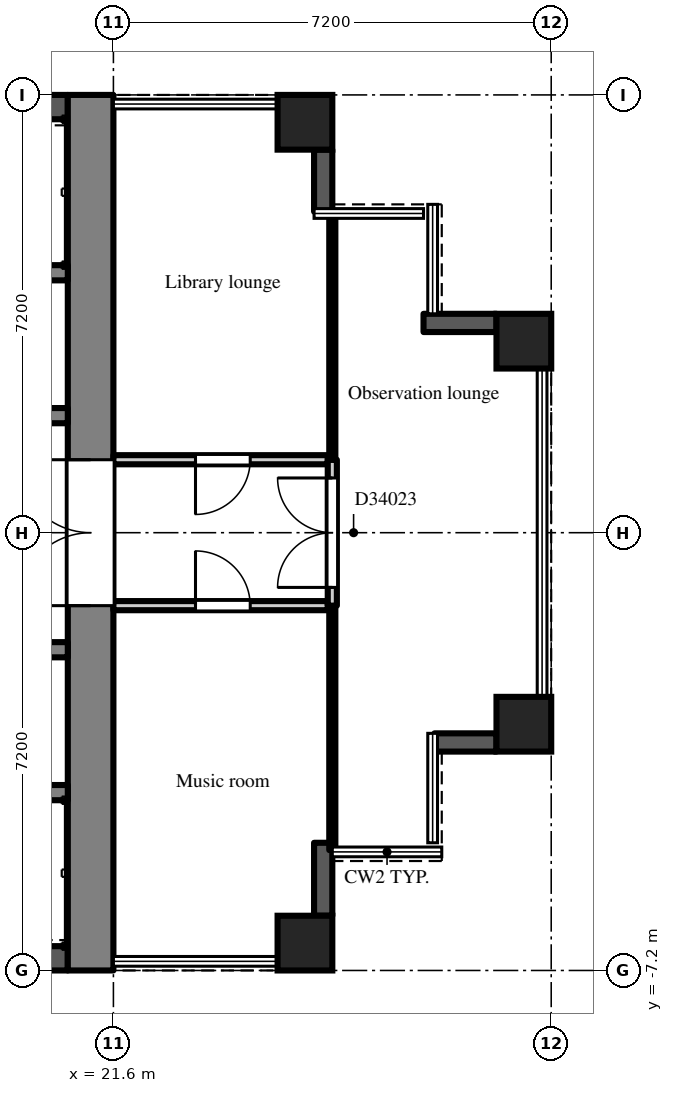
"""IFC4 building model, lengths in metres.
Left out: names, types, materials, properties, quantities, classifications, styles, units other than length and angle.
Written with IfcOpenShell. Run it as: python <this file> out.ifc"""

import sys

from ifc_helpers import new_model, si_unit, direction, frame, frame_2d, origin, origin_2d, place, context, subcontext, project, spatial, rectangle, extrude, element, fill, save


model = new_model("IFC4")
c1 = context("Model", 3, precision=1e-05, world=origin(), true_north=direction((0.0, 1.0)))
c2 = subcontext(c1, "Body", "Model", "MODEL_VIEW")
j1 = project(units=[si_unit("LENGTHUNIT", "METRE"), si_unit("PLANEANGLEUNIT", "RADIAN")], contexts=[c1])
p1 = place(None, origin())
s1 = spatial("IfcSite", under=j1, at=p1, CompositionType="ELEMENT")
p2 = place(p1, origin())
s2 = spatial("IfcBuilding", under=s1, at=p2, CompositionType="ELEMENT")
p3 = place(p2, frame((0.0, 0.0, 237.9)))
s3 = spatial("IfcBuildingStorey", under=s2, at=p3, CompositionType="ELEMENT", Elevation=237.9)
for number, where, z_axis, x_axis in (
    (1, (24.75, -6.75, 0.0), (0.0, 0.0, 1.0), (1.0, 0.0, 0.0)),
    (2, (24.75, 6.75, 0.0), (0.0, 0.0, 1.0), (1.0, 0.0, 0.0)),
    (3, (28.35, -3.15, 0.0), (0.0, 0.0, 1.0), (1.0, 0.0, 0.0)),
    (4, (28.35, 3.15, 0.0), (0.0, 0.0, 1.0), (1.0, 0.0, 0.0)),
):
    element("IfcColumn", number, at=place(p3, frame(where, z_axis=z_axis, x_axis=x_axis)), inside=s3, PredefinedType="COLUMN", context=c2, shape_type="SweptSolid", body=[
        extrude(rectangle(XDim=0.9, YDim=0.9, at=origin_2d()), origin(), (0.0, 0.0, 1.0), 4.2),
    ])
p4 = place(p3, frame((25.05, -6.3, 0.0), z_axis=(0.0, 0.0, 1.0), x_axis=(0.0, 1.0, 0.0)))
e5 = element("IfcWall", 5, at=p4, inside=s3, PredefinedType="SOLIDWALL", context=c2, shape_type="SweptSolid", body=[
    extrude(rectangle(XDim=1.2, YDim=0.3, at=frame_2d((0.6, 0.0))), origin(), (0.0, 0.0, 1.0), 3.75),
])
p5 = place(p3, frame((26.88, -3.45, 0.0), z_axis=(0.0, 0.0, 1.0), x_axis=(1.0, 0.0, 0.0)))
e6 = element("IfcWall", 6, at=p5, inside=s3, PredefinedType="SOLIDWALL", context=c2, shape_type="SweptSolid", body=[
    extrude(rectangle(XDim=1.02, YDim=0.3, at=frame_2d((0.51, 0.0))), origin(), (0.0, 0.0, 1.0), 3.75),
])
p6 = place(p3, frame((27.9, 3.45, 0.0), z_axis=(0.0, 0.0, 1.0), x_axis=(-1.0, 0.0, 0.0)))
e7 = element("IfcWall", 7, at=p6, inside=s3, PredefinedType="SOLIDWALL", context=c2, shape_type="SweptSolid", body=[
    extrude(rectangle(XDim=1.2, YDim=0.3, at=frame_2d((0.6, 0.0))), origin(), (0.0, 0.0, 1.0), 3.75),
])
p7 = place(p3, frame((25.05, 5.28, 0.0), z_axis=(0.0, 0.0, 1.0), x_axis=(0.0, 1.0, 0.0)))
e8 = element("IfcWall", 8, at=p7, inside=s3, PredefinedType="SOLIDWALL", context=c2, shape_type="SweptSolid", body=[
    extrude(rectangle(XDim=1.02, YDim=0.3, at=frame_2d((0.51, 0.0))), origin(), (0.0, 0.0, 1.0), 3.75),
])
p8 = place(p3, frame((21.225, -7.2, 0.0), z_axis=(0.0, 0.0, 1.0), x_axis=(0.0, 1.0, 0.0)))
e9 = element("IfcWall", 9, at=p8, inside=s3, PredefinedType="SHEAR", context=c2, shape_type="SweptSolid", body=[
    extrude(rectangle(XDim=14.4, YDim=0.75, at=frame_2d((7.2, 0.0))), origin(), (0.0, 0.0, 1.0), 3.75),
])
p9 = place(p8, frame((6.0, 0.0, 0.0)))
e10 = element("IfcOpeningElement", 10, at=p9, cuts=e9, PredefinedType="OPENING", context=c2, shape_type="SweptSolid", body=[
    extrude(rectangle(XDim=2.4, YDim=2.2, at=frame_2d((1.2, 1.1))), frame((0.0, 0.385, 0.0), z_axis=(0.0, -1.0, 0.0), x_axis=(1.0, 0.0, 0.0)), (0.0, 0.0, 1.0), 0.77),
])
p10 = place(p3, frame((7.9, 7.0, 0.0), z_axis=(0.0, 0.0, 1.0), x_axis=(1.0, 0.0, 0.0)))
e11 = element("IfcWall", 11, at=p10, inside=s3, PredefinedType="SHEAR", context=c2, shape_type="SweptSolid", body=[
    extrude(rectangle(XDim=12.95, YDim=0.4, at=frame_2d((6.475, 0.0))), origin(), (0.0, 0.0, 1.0), 3.75),
])
p11 = place(p3, frame((7.9, 1.925, 0.0), z_axis=(0.0, 0.0, 1.0), x_axis=(1.0, 0.0, 0.0)))
e12 = element("IfcWall", 12, at=p11, inside=s3, PredefinedType="SHEAR", context=c2, shape_type="SweptSolid", body=[
    extrude(rectangle(XDim=12.95, YDim=0.25, at=frame_2d((6.475, 0.0))), origin(), (0.0, 0.0, 1.0), 3.75),
])
p12 = place(p11, frame((4.825, 0.0, 0.0)))
e13 = element("IfcOpeningElement", 13, at=p12, cuts=e12, PredefinedType="OPENING", context=c2, shape_type="SweptSolid", body=[
    extrude(rectangle(XDim=1.1, YDim=2.1, at=frame_2d((0.55, 1.05))), frame((0.0, 0.135, 0.0), z_axis=(0.0, -1.0, 0.0), x_axis=(1.0, 0.0, 0.0)), (0.0, 0.0, 1.0), 0.27),
])
p13 = place(p11, frame((7.025, 0.0, 0.0)))
e14 = element("IfcOpeningElement", 14, at=p13, cuts=e12, PredefinedType="OPENING", context=c2, shape_type="SweptSolid", body=[
    extrude(rectangle(XDim=1.1, YDim=2.1, at=frame_2d((0.55, 1.05))), frame((0.0, 0.135, 0.0), z_axis=(0.0, -1.0, 0.0), x_axis=(1.0, 0.0, 0.0)), (0.0, 0.0, 1.0), 0.27),
])
p14 = place(p11, frame((9.225, 0.0, 0.0)))
e15 = element("IfcOpeningElement", 15, at=p14, cuts=e12, PredefinedType="OPENING", context=c2, shape_type="SweptSolid", body=[
    extrude(rectangle(XDim=1.1, YDim=2.1, at=frame_2d((0.55, 1.05))), frame((0.0, 0.135, 0.0), z_axis=(0.0, -1.0, 0.0), x_axis=(1.0, 0.0, 0.0)), (0.0, 0.0, 1.0), 0.27),
])
p15 = place(p11, frame((0.525, 0.0, 0.0)))
e16 = element("IfcOpeningElement", 16, at=p15, cuts=e12, PredefinedType="OPENING", context=c2, shape_type="SweptSolid", body=[
    extrude(rectangle(XDim=0.9, YDim=2.1, at=frame_2d((0.45, 1.05))), frame((0.0, 0.135, 0.0), z_axis=(0.0, -1.0, 0.0), x_axis=(1.0, 0.0, 0.0)), (0.0, 0.0, 1.0), 0.27),
])
p16 = place(p11, frame((2.575, 0.0, 0.0)))
e17 = element("IfcOpeningElement", 17, at=p16, cuts=e12, PredefinedType="OPENING", context=c2, shape_type="SweptSolid", body=[
    extrude(rectangle(XDim=1.2, YDim=2.1, at=frame_2d((0.6, 1.05))), frame((0.0, 0.135, 0.0), z_axis=(0.0, -1.0, 0.0), x_axis=(1.0, 0.0, 0.0)), (0.0, 0.0, 1.0), 0.27),
])
p17 = place(p11, frame((11.525, 0.0, 0.0)))
e18 = element("IfcOpeningElement", 18, at=p17, cuts=e12, PredefinedType="OPENING", context=c2, shape_type="SweptSolid", body=[
    extrude(rectangle(XDim=0.9, YDim=2.1, at=frame_2d((0.45, 1.05))), frame((0.0, 0.135, 0.0), z_axis=(0.0, -1.0, 0.0), x_axis=(1.0, 0.0, 0.0)), (0.0, 0.0, 1.0), 0.27),
])
p18 = place(p3, frame((12.3, 4.275, 0.0), z_axis=(0.0, 0.0, 1.0), x_axis=(1.0, 0.0, 0.0)))
e19 = element("IfcWall", 19, at=p18, inside=s3, PredefinedType="SHEAR", context=c2, shape_type="SweptSolid", body=[
    extrude(rectangle(XDim=8.55, YDim=0.25, at=frame_2d((4.275, 0.0))), origin(), (0.0, 0.0, 1.0), 3.75),
])
p19 = place(p3, frame((7.9, -7.0, 0.0), z_axis=(0.0, 0.0, 1.0), x_axis=(1.0, 0.0, 0.0)))
e20 = element("IfcWall", 20, at=p19, inside=s3, PredefinedType="SHEAR", context=c2, shape_type="SweptSolid", body=[
    extrude(rectangle(XDim=12.95, YDim=0.4, at=frame_2d((6.475, 0.0))), origin(), (0.0, 0.0, 1.0), 3.75),
])
p20 = place(p3, frame((7.9, -1.925, 0.0), z_axis=(0.0, 0.0, 1.0), x_axis=(1.0, 0.0, 0.0)))
e21 = element("IfcWall", 21, at=p20, inside=s3, PredefinedType="SHEAR", context=c2, shape_type="SweptSolid", body=[
    extrude(rectangle(XDim=12.95, YDim=0.25, at=frame_2d((6.475, 0.0))), origin(), (0.0, 0.0, 1.0), 3.75),
])
p21 = place(p20, frame((0.525, 0.0, 0.0)))
e22 = element("IfcOpeningElement", 22, at=p21, cuts=e21, PredefinedType="OPENING", context=c2, shape_type="SweptSolid", body=[
    extrude(rectangle(XDim=0.9, YDim=2.1, at=frame_2d((0.45, 1.05))), frame((0.0, 0.135, 0.0), z_axis=(0.0, -1.0, 0.0), x_axis=(1.0, 0.0, 0.0)), (0.0, 0.0, 1.0), 0.27),
])
p22 = place(p20, frame((2.575, 0.0, 0.0)))
e23 = element("IfcOpeningElement", 23, at=p22, cuts=e21, PredefinedType="OPENING", context=c2, shape_type="SweptSolid", body=[
    extrude(rectangle(XDim=1.2, YDim=2.1, at=frame_2d((0.6, 1.05))), frame((0.0, 0.135, 0.0), z_axis=(0.0, -1.0, 0.0), x_axis=(1.0, 0.0, 0.0)), (0.0, 0.0, 1.0), 0.27),
])
p23 = place(p20, frame((6.025, 0.0, 0.0)))
e24 = element("IfcOpeningElement", 24, at=p23, cuts=e21, PredefinedType="OPENING", context=c2, shape_type="SweptSolid", body=[
    extrude(rectangle(XDim=0.9, YDim=2.1, at=frame_2d((0.45, 1.05))), frame((0.0, 0.135, 0.0), z_axis=(0.0, -1.0, 0.0), x_axis=(1.0, 0.0, 0.0)), (0.0, 0.0, 1.0), 0.27),
])
p24 = place(p20, frame((10.425, 0.0, 0.0)))
e25 = element("IfcOpeningElement", 25, at=p24, cuts=e21, PredefinedType="OPENING", context=c2, shape_type="SweptSolid", body=[
    extrude(rectangle(XDim=0.9, YDim=2.1, at=frame_2d((0.45, 1.05))), frame((0.0, 0.135, 0.0), z_axis=(0.0, -1.0, 0.0), x_axis=(1.0, 0.0, 0.0)), (0.0, 0.0, 1.0), 0.27),
])
p25 = place(p3, frame((12.3, -4.275, 0.0), z_axis=(0.0, 0.0, 1.0), x_axis=(1.0, 0.0, 0.0)))
e26 = element("IfcWall", 26, at=p25, inside=s3, PredefinedType="SHEAR", context=c2, shape_type="SweptSolid", body=[
    extrude(rectangle(XDim=8.55, YDim=0.25, at=frame_2d((4.275, 0.0))), origin(), (0.0, 0.0, 1.0), 3.75),
])
p26 = place(p3, frame((21.6, -1.2, 0.0), z_axis=(0.0, 0.0, 1.0), x_axis=(1.0, 0.0, 0.0)))
e27 = element("IfcWall", 27, at=p26, inside=s3, PredefinedType="PARTITIONING", context=c2, shape_type="SweptSolid", body=[
    extrude(rectangle(XDim=3.525, YDim=0.15, at=frame_2d((1.762, 0.0))), origin(), (0.0, 0.0, 1.0), 3.75),
])
p27 = place(p26, frame((1.35, 0.0, 0.0)))
e28 = element("IfcOpeningElement", 28, at=p27, cuts=e27, PredefinedType="OPENING", context=c2, shape_type="SweptSolid", body=[
    extrude(rectangle(XDim=0.9, YDim=2.1, at=frame_2d((0.45, 1.05))), frame((0.0, 0.085, 0.0), z_axis=(0.0, -1.0, 0.0), x_axis=(1.0, 0.0, 0.0)), (0.0, 0.0, 1.0), 0.17),
])
p28 = place(p3, frame((21.6, 1.2, 0.0), z_axis=(0.0, 0.0, 1.0), x_axis=(1.0, 0.0, 0.0)))
e29 = element("IfcWall", 29, at=p28, inside=s3, PredefinedType="PARTITIONING", context=c2, shape_type="SweptSolid", body=[
    extrude(rectangle(XDim=3.525, YDim=0.15, at=frame_2d((1.762, 0.0))), origin(), (0.0, 0.0, 1.0), 3.75),
])
p29 = place(p28, frame((1.35, 0.0, 0.0)))
e30 = element("IfcOpeningElement", 30, at=p29, cuts=e29, PredefinedType="OPENING", context=c2, shape_type="SweptSolid", body=[
    extrude(rectangle(XDim=0.9, YDim=2.1, at=frame_2d((0.45, 1.05))), frame((0.0, 0.085, 0.0), z_axis=(0.0, -1.0, 0.0), x_axis=(1.0, 0.0, 0.0)), (0.0, 0.0, 1.0), 0.17),
])
p30 = place(p3, frame((25.2, -5.22, 0.0), z_axis=(0.0, 0.0, 1.0), x_axis=(0.0, 1.0, 0.0)))
e31 = element("IfcWall", 31, at=p30, inside=s3, PredefinedType="PARTITIONING", context=c2, shape_type="SweptSolid", body=[
    extrude(rectangle(XDim=4.02, YDim=0.1, at=frame_2d((2.01, 0.0))), origin(), (0.0, 0.0, 1.0), 3.75),
])
p31 = place(p3, frame((25.2, -1.2, 0.0), z_axis=(0.0, 0.0, 1.0), x_axis=(0.0, 1.0, 0.0)))
e32 = element("IfcWall", 32, at=p31, inside=s3, PredefinedType="PARTITIONING", context=c2, shape_type="SweptSolid", body=[
    extrude(rectangle(XDim=2.4, YDim=0.15, at=frame_2d((1.2, 0.0))), origin(), (0.0, 0.0, 1.0), 3.75),
])
p32 = place(p31, frame((0.3, 0.0, 0.0)))
e33 = element("IfcOpeningElement", 33, at=p32, cuts=e32, PredefinedType="OPENING", context=c2, shape_type="SweptSolid", body=[
    extrude(rectangle(XDim=1.8, YDim=2.1, at=frame_2d((0.9, 1.05))), frame((0.0, 0.085, 0.0), z_axis=(0.0, -1.0, 0.0), x_axis=(1.0, 0.0, 0.0)), (0.0, 0.0, 1.0), 0.17),
])
p33 = place(p3, frame((25.2, 1.2, 0.0), z_axis=(0.0, 0.0, 1.0), x_axis=(0.0, 1.0, 0.0)))
e34 = element("IfcWall", 34, at=p33, inside=s3, PredefinedType="PARTITIONING", context=c2, shape_type="SweptSolid", body=[
    extrude(rectangle(XDim=4.02, YDim=0.1, at=frame_2d((2.01, 0.0))), origin(), (0.0, 0.0, 1.0), 3.75),
])
p34 = place(p9, origin())
e35 = element("IfcDoor", 35, at=p34, inside=s3, OperationType="DOUBLE_DOOR_DOUBLE_SWING", PredefinedType="DOOR", context=c2, shape_type="SweptSolid", body=[
    extrude(rectangle(XDim=2.4, YDim=2.2, at=frame_2d((1.2, 1.1))), frame((0.0, 0.025, 0.0), z_axis=(0.0, -1.0, 0.0), x_axis=(1.0, 0.0, 0.0)), (0.0, 0.0, 1.0), 0.05),
])
fill(e10, e35)
p35 = place(p32, origin())
e36 = element("IfcDoor", 36, at=p35, inside=s3, OperationType="DOUBLE_DOOR_DOUBLE_SWING", PredefinedType="DOOR", context=c2, shape_type="SweptSolid", body=[
    extrude(rectangle(XDim=1.8, YDim=2.1, at=frame_2d((0.9, 1.05))), frame((0.0, 0.025, 0.0), z_axis=(0.0, -1.0, 0.0), x_axis=(1.0, 0.0, 0.0)), (0.0, 0.0, 1.0), 0.05),
])
fill(e33, e36)
p36 = place(p29, frame((0.9, 0.0, 0.0), z_axis=(0.0, 0.0, 1.0), x_axis=(-1.0, 0.0, 0.0)))
e37 = element("IfcDoor", 37, at=p36, inside=s3, OperationType="SINGLE_SWING_RIGHT", PredefinedType="DOOR", context=c2, shape_type="SweptSolid", body=[
    extrude(rectangle(XDim=0.9, YDim=2.1, at=frame_2d((0.45, 1.05))), frame((0.0, 0.025, 0.0), z_axis=(0.0, -1.0, 0.0), x_axis=(1.0, 0.0, 0.0)), (0.0, 0.0, 1.0), 0.05),
])
fill(e30, e37)
p37 = place(p27, origin())
e38 = element("IfcDoor", 38, at=p37, inside=s3, OperationType="SINGLE_SWING_LEFT", PredefinedType="DOOR", context=c2, shape_type="SweptSolid", body=[
    extrude(rectangle(XDim=0.9, YDim=2.1, at=frame_2d((0.45, 1.05))), frame((0.0, 0.025, 0.0), z_axis=(0.0, -1.0, 0.0), x_axis=(1.0, 0.0, 0.0)), (0.0, 0.0, 1.0), 0.05),
])
fill(e28, e38)
save(model, sys.argv[1])
